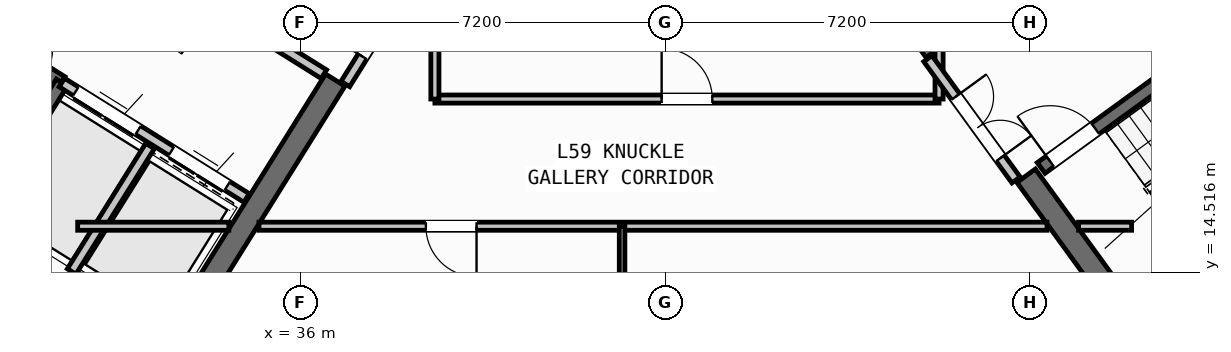
"""IFC4 building model, lengths in metres.
Left out: names, types, materials, properties, quantities, classifications, styles, units other than length and angle.
Written with IfcOpenShell. Run it as: python <this file> out.ifc"""

import sys

from ifc_helpers import new_model, si_unit, direction, frame, frame_2d, origin, place, context, subcontext, project, spatial, rectangle, extrude, source, transform, mapped, element, fill, save


model = new_model("IFC4")
c1 = context("Model", 3, precision=1e-05, world=origin(), true_north=direction((0.0, 1.0)))
c2 = subcontext(c1, "Body", "Model", "MODEL_VIEW")
j1 = project(units=[si_unit("LENGTHUNIT", "METRE"), si_unit("PLANEANGLEUNIT", "RADIAN")], contexts=[c1])
p1 = place(None, origin())
s1 = spatial("IfcSite", under=j1, at=p1, CompositionType="ELEMENT")
p2 = place(p1, origin())
s2 = spatial("IfcBuilding", under=s1, at=p2, CompositionType="ELEMENT")
p3 = place(p2, frame((0.0, 0.0, 233.7)))
s3 = spatial("IfcBuildingStorey", under=s2, at=p3, CompositionType="ELEMENT", Elevation=233.7)
p4 = place(p3, frame((33.324, 12.503, 0.0), z_axis=(0.0, 0.0, 1.0), x_axis=(-0.848043529849, 0.529926571782, 0.0)))
e1 = element("IfcWall", 1, at=p4, inside=s3, PredefinedType="SHEAR", context=c2, shape_type="SweptSolid", body=[
    extrude(rectangle(XDim=13.04, YDim=0.45, at=frame_2d((6.52, 0.0))), origin(), (0.0, 0.0, 1.0), 4.55),
])
p5 = place(p3, frame((36.683, 18.304, 0.0), z_axis=(0.0, 0.0, 1.0), x_axis=(-0.529904039071, -0.848057609704, 0.0)))
e2 = element("IfcWall", 2, at=p5, inside=s3, PredefinedType="SHEAR", context=c2, shape_type="SweptSolid", body=[
    extrude(rectangle(XDim=6.475, YDim=0.45, at=frame_2d((3.238, 0.0))), origin(), (0.0, 0.0, 1.0), 4.55),
])
p6 = place(p3, frame((52.399, 13.169, 0.0), z_axis=(0.0, 0.0, 1.0), x_axis=(0.809022352778, 0.587777877013, 0.0)))
e3 = element("IfcWall", 3, at=p6, inside=s3, PredefinedType="SHEAR", context=c2, shape_type="SweptSolid", body=[
    extrude(rectangle(XDim=12.24, YDim=0.45, at=frame_2d((6.12, 0.0))), origin(), (0.0, 0.0, 1.0), 4.55),
])
p7 = place(p3, frame((52.449, 13.483, 0.0), z_axis=(0.0, 0.0, 1.0), x_axis=(-0.587819244441, 0.808992296542, 0.0)))
e4 = element("IfcWall", 4, at=p7, inside=s3, PredefinedType="SHEAR", context=c2, shape_type="SweptSolid", body=[
    extrude(rectangle(XDim=3.625, YDim=0.45, at=frame_2d((1.812, 0.0))), origin(), (0.0, 0.0, 1.0), 4.55),
])
p8 = place(p3, frame((48.526, 18.884, 0.0), z_axis=(0.0, 0.0, 1.0), x_axis=(-0.587774812919, 0.809024578921, 0.0)))
e5 = element("IfcWall", 5, at=p8, inside=s3, PredefinedType="SHEAR", context=c2, shape_type="SweptSolid", body=[
    extrude(rectangle(XDim=6.475, YDim=0.45, at=frame_2d((3.238, 0.0))), origin(), (0.0, 0.0, 1.0), 4.55),
])
p9 = place(p3, frame((31.28, 18.261, 0.0), z_axis=(0.0, 0.0, 1.0), x_axis=(-0.848051618787, 0.529913626805, 0.0)))
e6 = element("IfcWall", 6, at=p9, inside=s3, PredefinedType="SHEAR", context=c2, shape_type="SweptSolid", body=[
    extrude(rectangle(XDim=7.46, YDim=0.26, at=frame_2d((3.73, 0.0))), origin(), (0.0, 0.0, 1.0), 4.55),
])
p10 = place(p9, frame((0.36, 0.0, 0.0)))
e7 = element("IfcOpeningElement", 7, at=p10, cuts=e6, PredefinedType="OPENING", context=c2, shape_type="SweptSolid", body=[
    extrude(rectangle(XDim=0.86, YDim=2.05, at=frame_2d((0.43, 1.025))), frame((0.0, 0.14, 0.0), z_axis=(0.0, -1.0, 0.0), x_axis=(1.0, 0.0, 0.0)), (0.0, 0.0, 1.0), 0.28),
])
p11 = place(p3, frame((31.288, 18.256, 0.0), z_axis=(0.0, 0.0, 1.0), x_axis=(-0.529943379326, -0.848033026897, 0.0)))
e8 = element("IfcWall", 8, at=p11, inside=s3, PredefinedType="SHEAR", context=c2, shape_type="SweptSolid", body=[
    extrude(rectangle(XDim=3.16, YDim=0.26, at=frame_2d((1.58, 0.0))), origin(), (0.0, 0.0, 1.0), 4.55),
])
p12 = place(p3, frame((34.933, 15.978, 0.0), z_axis=(0.0, 0.0, 1.0), x_axis=(-0.848055739377, 0.529907032327, 0.0)))
e9 = element("IfcWall", 9, at=p12, inside=s3, PredefinedType="STANDARD", context=c2, shape_type="SweptSolid", body=[
    extrude(rectangle(XDim=4.298, YDim=0.2, at=frame_2d((2.149, 0.0))), origin(), (0.0, 0.0, 1.0), 4.54),
])
p13 = place(p12, frame((0.448, 0.0, 0.0)))
e10 = element("IfcOpeningElement", 10, at=p13, cuts=e9, PredefinedType="OPENING", context=c2, shape_type="SweptSolid", body=[
    extrude(rectangle(XDim=1.3, YDim=2.2, at=frame_2d((0.65, 1.1))), frame((0.0, 0.11, 0.0), z_axis=(0.0, -1.0, 0.0), x_axis=(1.0, 0.0, 0.0)), (0.0, 0.0, 1.0), 0.22),
])
p14 = place(p12, frame((2.523, 0.0, 0.0)))
e11 = element("IfcOpeningElement", 11, at=p14, cuts=e9, PredefinedType="OPENING", context=c2, shape_type="SweptSolid", body=[
    extrude(rectangle(XDim=1.45, YDim=2.25, at=frame_2d((0.725, 1.125))), frame((0.0, 0.11, 0.0), z_axis=(0.0, -1.0, 0.0), x_axis=(1.0, 0.0, 0.0)), (0.0, 0.0, 1.0), 0.22),
])
p15 = place(p3, frame((36.459, 18.421, 0.0), z_axis=(0.0, 0.0, 1.0), x_axis=(-0.848059591691, 0.529900867089, 0.0)))
e12 = element("IfcWall", 12, at=p15, inside=s3, PredefinedType="STANDARD", context=c2, shape_type="SweptSolid", body=[
    extrude(rectangle(XDim=5.818, YDim=0.2, at=frame_2d((2.909, 0.0))), origin(), (0.0, 0.0, 1.0), 4.54),
])
p16 = place(p15, frame((2.598, 0.0, 0.0)))
e13 = element("IfcOpeningElement", 13, at=p16, cuts=e12, PredefinedType="OPENING", context=c2, shape_type="SweptSolid", body=[
    extrude(rectangle(XDim=1.15, YDim=2.1, at=frame_2d((0.575, 1.05))), frame((0.0, 0.11, 0.0), z_axis=(0.0, -1.0, 0.0), x_axis=(1.0, 0.0, 0.0)), (0.0, 0.0, 1.0), 0.22),
])
p17 = place(p3, frame((33.029, 17.003, 0.0), z_axis=(0.0, 0.0, 1.0), x_axis=(-0.529916267533, -0.848049968695, 0.0)))
e14 = element("IfcWall", 14, at=p17, inside=s3, PredefinedType="STANDARD", context=c2, shape_type="SweptSolid", body=[
    extrude(rectangle(XDim=2.92, YDim=0.2, at=frame_2d((1.46, 0.0))), origin(), (0.0, 0.0, 1.0), 4.54),
])
p18 = place(p3, frame((52.472, 14.013, 0.0), z_axis=(0.0, 0.0, 1.0), x_axis=(0.809028366311, 0.587769599847, 0.0)))
e15 = element("IfcWall", 15, at=p18, inside=s3, PredefinedType="SHEAR", context=c2, shape_type="SweptSolid", body=[
    extrude(rectangle(XDim=7.33, YDim=0.26, at=frame_2d((3.665, 0.0))), origin(), (0.0, 0.0, 1.0), 4.55),
])
p19 = place(p3, frame((50.615, 16.57, 0.0), z_axis=(0.0, 0.0, 1.0), x_axis=(0.809028366311, 0.587769599847, 0.0)))
e16 = element("IfcWall", 16, at=p19, inside=s3, PredefinedType="SHEAR", context=c2, shape_type="SweptSolid", body=[
    extrude(rectangle(XDim=7.33, YDim=0.26, at=frame_2d((3.665, 0.0))), origin(), (0.0, 0.0, 1.0), 4.55),
])
p20 = place(p19, frame((0.22, 0.0, 0.0)))
e17 = element("IfcOpeningElement", 17, at=p20, cuts=e16, PredefinedType="OPENING", context=c2, shape_type="SweptSolid", body=[
    extrude(rectangle(XDim=1.1, YDim=2.1, at=frame_2d((0.55, 1.05))), frame((0.0, 0.14, 0.0), z_axis=(0.0, -1.0, 0.0), x_axis=(1.0, 0.0, 0.0)), (0.0, 0.0, 1.0), 0.28),
])
p21 = place(p3, frame((32.164, 10.374, 0.0), z_axis=(0.0, 0.0, 1.0), x_axis=(-0.848044107957, 0.529925646633, 0.0)))
e18 = element("IfcWall", 18, at=p21, inside=s3, PredefinedType="PARTITIONING", context=c2, shape_type="SweptSolid", body=[
    extrude(rectangle(XDim=15.57, YDim=0.16, at=frame_2d((7.785, 0.0))), origin(), (0.0, 0.0, 1.0), 4.54),
])
p22 = place(p21, frame((4.1, 0.0, 0.0)))
e19 = element("IfcOpeningElement", 19, at=p22, cuts=e18, PredefinedType="OPENING", context=c2, shape_type="SweptSolid", body=[
    extrude(rectangle(XDim=0.96, YDim=2.08, at=frame_2d((0.48, 1.04))), frame((0.0, 0.09, 0.0), z_axis=(0.0, -1.0, 0.0), x_axis=(1.0, 0.0, 0.0)), (0.0, 0.0, 1.0), 0.18),
])
p23 = place(p21, frame((8.2, 0.0, 0.0)))
e20 = element("IfcOpeningElement", 20, at=p23, cuts=e18, PredefinedType="OPENING", context=c2, shape_type="SweptSolid", body=[
    extrude(rectangle(XDim=1.7, YDim=2.2, at=frame_2d((0.85, 1.1))), frame((0.0, 0.09, 0.0), z_axis=(0.0, -1.0, 0.0), x_axis=(1.0, 0.0, 0.0)), (0.0, 0.0, 1.0), 0.18),
])
p24 = place(p3, frame((38.451, 20.737, 0.0), z_axis=(0.0, 0.0, 1.0), x_axis=(-0.529924799939, -0.848044637038, 0.0)))
e21 = element("IfcWall", 21, at=p24, inside=s3, PredefinedType="STANDARD", context=c2, shape_type="SweptSolid", body=[
    extrude(rectangle(XDim=2.96, YDim=0.2, at=frame_2d((1.48, 0.0))), origin(), (0.0, 0.0, 1.0), 4.54),
])
p25 = place(p24, frame((1.46, 0.0, 0.0)))
e22 = element("IfcOpeningElement", 22, at=p25, cuts=e21, PredefinedType="OPENING", context=c2, shape_type="SweptSolid", body=[
    extrude(rectangle(XDim=0.86, YDim=2.05, at=frame_2d((0.43, 1.025))), frame((0.0, 0.11, 0.0), z_axis=(0.0, -1.0, 0.0), x_axis=(1.0, 0.0, 0.0)), (0.0, 0.0, 1.0), 0.22),
])
p26 = place(p3, frame((31.6, 15.42, 0.0), z_axis=(0.0, 0.0, 1.0), x_axis=(1.0, 0.0, 0.0)))
e23 = element("IfcWall", 23, at=p26, inside=s3, PredefinedType="PARTITIONING", context=c2, shape_type="SweptSolid", body=[
    extrude(rectangle(XDim=2.984, YDim=0.16, at=frame_2d((1.492, 0.0))), origin(), (0.0, 0.0, 1.0), 4.54),
])
p27 = place(p3, frame((35.178, 15.42, 0.0), z_axis=(0.0, 0.0, 1.0), x_axis=(1.0, 0.0, 0.0)))
e24 = element("IfcWall", 24, at=p27, inside=s3, PredefinedType="PARTITIONING", context=c2, shape_type="SweptSolid", body=[
    extrude(rectangle(XDim=15.552, YDim=0.16, at=frame_2d((7.776, 0.0))), origin(), (0.0, 0.0, 1.0), 4.54),
])
p28 = place(p27, frame((3.294, 0.0, 0.0)))
e25 = element("IfcOpeningElement", 25, at=p28, cuts=e24, PredefinedType="OPENING", context=c2, shape_type="SweptSolid", body=[
    extrude(rectangle(XDim=1.0, YDim=2.1, at=frame_2d((0.5, 1.05))), frame((0.0, 0.09, 0.0), z_axis=(0.0, -1.0, 0.0), x_axis=(1.0, 0.0, 0.0)), (0.0, 0.0, 1.0), 0.18),
])
p29 = place(p3, frame((51.354, 15.42, 0.0), z_axis=(0.0, 0.0, 1.0), x_axis=(1.0, 0.0, 0.0)))
e26 = element("IfcWall", 26, at=p29, inside=s3, PredefinedType="PARTITIONING", context=c2, shape_type="SweptSolid", body=[
    extrude(rectangle(XDim=1.046, YDim=0.16, at=frame_2d((0.523, 0.0))), origin(), (0.0, 0.0, 1.0), 4.54),
])
p30 = place(p3, frame((38.65, 17.93, 0.0), z_axis=(0.0, 0.0, 1.0), x_axis=(1.0, 0.0, 0.0)))
e27 = element("IfcWall", 27, at=p30, inside=s3, PredefinedType="PARTITIONING", context=c2, shape_type="SweptSolid", body=[
    extrude(rectangle(XDim=9.95, YDim=0.16, at=frame_2d((4.975, 0.0))), origin(), (0.0, 0.0, 1.0), 4.54),
])
p31 = place(p30, frame((4.475, 0.0, 0.0)))
e28 = element("IfcOpeningElement", 28, at=p31, cuts=e27, PredefinedType="OPENING", context=c2, shape_type="SweptSolid", body=[
    extrude(rectangle(XDim=1.0, YDim=2.1, at=frame_2d((0.5, 1.05))), frame((0.0, 0.09, 0.0), z_axis=(0.0, -1.0, 0.0), x_axis=(1.0, 0.0, 0.0)), (0.0, 0.0, 1.0), 0.18),
])
p32 = place(p3, frame((38.65, 17.93, 0.0), z_axis=(0.0, 0.0, 1.0), x_axis=(0.0, 1.0, 0.0)))
e29 = element("IfcWall", 29, at=p32, inside=s3, PredefinedType="PARTITIONING", context=c2, shape_type="SweptSolid", body=[
    extrude(rectangle(XDim=3.046, YDim=0.16, at=frame_2d((1.523, 0.0))), origin(), (0.0, 0.0, 1.0), 4.54),
])
p33 = place(p3, frame((48.6, 17.93, 0.0), z_axis=(0.0, 0.0, 1.0), x_axis=(0.0, 1.0, 0.0)))
e30 = element("IfcWall", 30, at=p33, inside=s3, PredefinedType="PARTITIONING", context=c2, shape_type="SweptSolid", body=[
    extrude(rectangle(XDim=0.993, YDim=0.16, at=frame_2d((0.496, 0.0))), origin(), (0.0, 0.0, 1.0), 4.54),
])
p34 = place(p3, frame((50.119, 16.333, 0.0), z_axis=(0.0, 0.0, 1.0), x_axis=(-0.587749856981, 0.809042709391, 0.0)))
e31 = element("IfcWall", 31, at=p34, inside=s3, PredefinedType="STANDARD", context=c2, shape_type="SweptSolid", body=[
    extrude(rectangle(XDim=2.96, YDim=0.2, at=frame_2d((1.48, 0.0))), origin(), (0.0, 0.0, 1.0), 4.54),
])
p35 = place(p34, frame((0.53, 0.0, 0.0)))
e32 = element("IfcOpeningElement", 32, at=p35, cuts=e31, PredefinedType="OPENING", context=c2, shape_type="SweptSolid", body=[
    extrude(rectangle(XDim=1.5, YDim=2.15, at=frame_2d((0.75, 1.075))), frame((0.0, 0.11, 0.0), z_axis=(0.0, -1.0, 0.0), x_axis=(1.0, 0.0, 0.0)), (0.0, 0.0, 1.0), 0.22),
])
p36 = place(p3, frame((42.344, 1.96, 0.0), z_axis=(0.0, 0.0, 1.0), x_axis=(0.0, 1.0, 0.0)))
e33 = element("IfcWall", 33, at=p36, inside=s3, PredefinedType="PARTITIONING", context=c2, shape_type="SweptSolid", body=[
    extrude(rectangle(XDim=13.46, YDim=0.11, at=frame_2d((6.73, 0.0))), origin(), (0.0, 0.0, 1.0), 4.54),
])
p37 = place(p36, frame((5.44, 0.0, 0.0)))
e34 = element("IfcOpeningElement", 34, at=p37, cuts=e33, PredefinedType="OPENING", context=c2, shape_type="SweptSolid", body=[
    extrude(rectangle(XDim=0.92, YDim=2.08, at=frame_2d((0.46, 1.04))), frame((0.0, 0.065, 0.0), z_axis=(0.0, -1.0, 0.0), x_axis=(1.0, 0.0, 0.0)), (0.0, 0.0, 1.0), 0.13),
])
p38 = place(p36, frame((10.67, 0.0, 0.0)))
e35 = element("IfcOpeningElement", 35, at=p38, cuts=e33, PredefinedType="OPENING", context=c2, shape_type="SweptSolid", body=[
    extrude(rectangle(XDim=0.88, YDim=2.08, at=frame_2d((0.44, 1.04))), frame((0.0, 0.065, 0.0), z_axis=(0.0, -1.0, 0.0), x_axis=(1.0, 0.0, 0.0)), (0.0, 0.0, 1.0), 0.13),
])
m1 = source(origin(), c2, "Body", "SweptSolid", [
    extrude(rectangle(XDim=1.3, YDim=2.2, at=frame_2d((0.65, 1.1))), frame((0.0, 0.025, 0.0), z_axis=(0.0, -1.0, 0.0), x_axis=(1.0, 0.0, 0.0)), (0.0, 0.0, 1.0), 0.05),
])
p39 = place(p13, origin())
e36 = element("IfcDoor", 36, at=p39, inside=s3, OperationType="DOUBLE_DOOR_SLIDING", PredefinedType="DOOR", context=c2, shape_type="MappedRepresentation", body=[
    mapped(m1, transform((0.0, 0.0, 0.0), scale=1.0)),
])
fill(e10, e36)
m2 = source(origin(), c2, "Body", "SweptSolid", [
    extrude(rectangle(XDim=1.45, YDim=2.25, at=frame_2d((0.725, 1.125))), frame((0.0, 0.025, 0.0), z_axis=(0.0, -1.0, 0.0), x_axis=(1.0, 0.0, 0.0)), (0.0, 0.0, 1.0), 0.05),
])
p40 = place(p14, origin())
e37 = element("IfcDoor", 37, at=p40, inside=s3, OperationType="DOUBLE_DOOR_SLIDING", PredefinedType="DOOR", context=c2, shape_type="MappedRepresentation", body=[
    mapped(m2, transform((0.0, 0.0, 0.0), scale=1.0)),
])
fill(e11, e37)
m3 = source(origin(), c2, "Body", "SweptSolid", [
    extrude(rectangle(XDim=1.1, YDim=2.1, at=frame_2d((0.55, 1.05))), frame((0.0, 0.025, 0.0), z_axis=(0.0, -1.0, 0.0), x_axis=(1.0, 0.0, 0.0)), (0.0, 0.0, 1.0), 0.05),
])
p41 = place(p20, origin())
e38 = element("IfcDoor", 38, at=p41, inside=s3, OperationType="SINGLE_SWING_LEFT", PredefinedType="DOOR", context=c2, shape_type="MappedRepresentation", body=[
    mapped(m3, transform((0.0, 0.0, 0.0), scale=1.0)),
])
fill(e17, e38)
m4 = source(origin(), c2, "Body", "SweptSolid", [
    extrude(rectangle(XDim=1.0, YDim=2.1, at=frame_2d((0.5, 1.05))), frame((0.0, 0.025, 0.0), z_axis=(0.0, -1.0, 0.0), x_axis=(1.0, 0.0, 0.0)), (0.0, 0.0, 1.0), 0.05),
])
p42 = place(p31, origin())
e39 = element("IfcDoor", 39, at=p42, inside=s3, OperationType="SINGLE_SWING_LEFT", PredefinedType="DOOR", context=c2, shape_type="MappedRepresentation", body=[
    mapped(m4, transform((0.0, 0.0, 0.0), scale=1.0)),
])
fill(e28, e39)
m5 = source(origin(), c2, "Body", "SweptSolid", [
    extrude(rectangle(XDim=0.86, YDim=2.05, at=frame_2d((0.43, 1.025))), frame((0.0, 0.025, 0.0), z_axis=(0.0, -1.0, 0.0), x_axis=(1.0, 0.0, 0.0)), (0.0, 0.0, 1.0), 0.05),
])
p43 = place(p25, frame((0.86, 0.0, 0.0), z_axis=(0.0, 0.0, 1.0), x_axis=(-1.0, 0.0, 0.0)))
e40 = element("IfcDoor", 40, at=p43, inside=s3, OperationType="SINGLE_SWING_LEFT", PredefinedType="DOOR", context=c2, shape_type="MappedRepresentation", body=[
    mapped(m5, transform((0.0, 0.0, 0.0), scale=1.0)),
])
fill(e22, e40)
m6 = source(origin(), c2, "Body", "SweptSolid", [
    extrude(rectangle(XDim=1.5, YDim=2.15, at=frame_2d((0.75, 1.075))), frame((0.0, 0.025, 0.0), z_axis=(0.0, -1.0, 0.0), x_axis=(1.0, 0.0, 0.0)), (0.0, 0.0, 1.0), 0.05),
])
p44 = place(p35, frame((1.5, 0.0, 0.0), z_axis=(0.0, 0.0, 1.0), x_axis=(-1.0, 0.0, 0.0)))
e41 = element("IfcDoor", 41, at=p44, inside=s3, OperationType="DOUBLE_DOOR_SINGLE_SWING", PredefinedType="DOOR", context=c2, shape_type="MappedRepresentation", body=[
    mapped(m6, transform((0.0, 0.0, 0.0), scale=1.0)),
])
fill(e32, e41)
p45 = place(p28, frame((1.0, 0.0, 0.0), z_axis=(0.0, 0.0, 1.0), x_axis=(-1.0, 0.0, 0.0)))
e42 = element("IfcDoor", 42, at=p45, inside=s3, OperationType="SINGLE_SWING_LEFT", PredefinedType="DOOR", context=c2, shape_type="MappedRepresentation", body=[
    mapped(m4, transform((0.0, 0.0, 0.0), scale=1.0)),
])
fill(e25, e42)
save(model, sys.argv[1])
